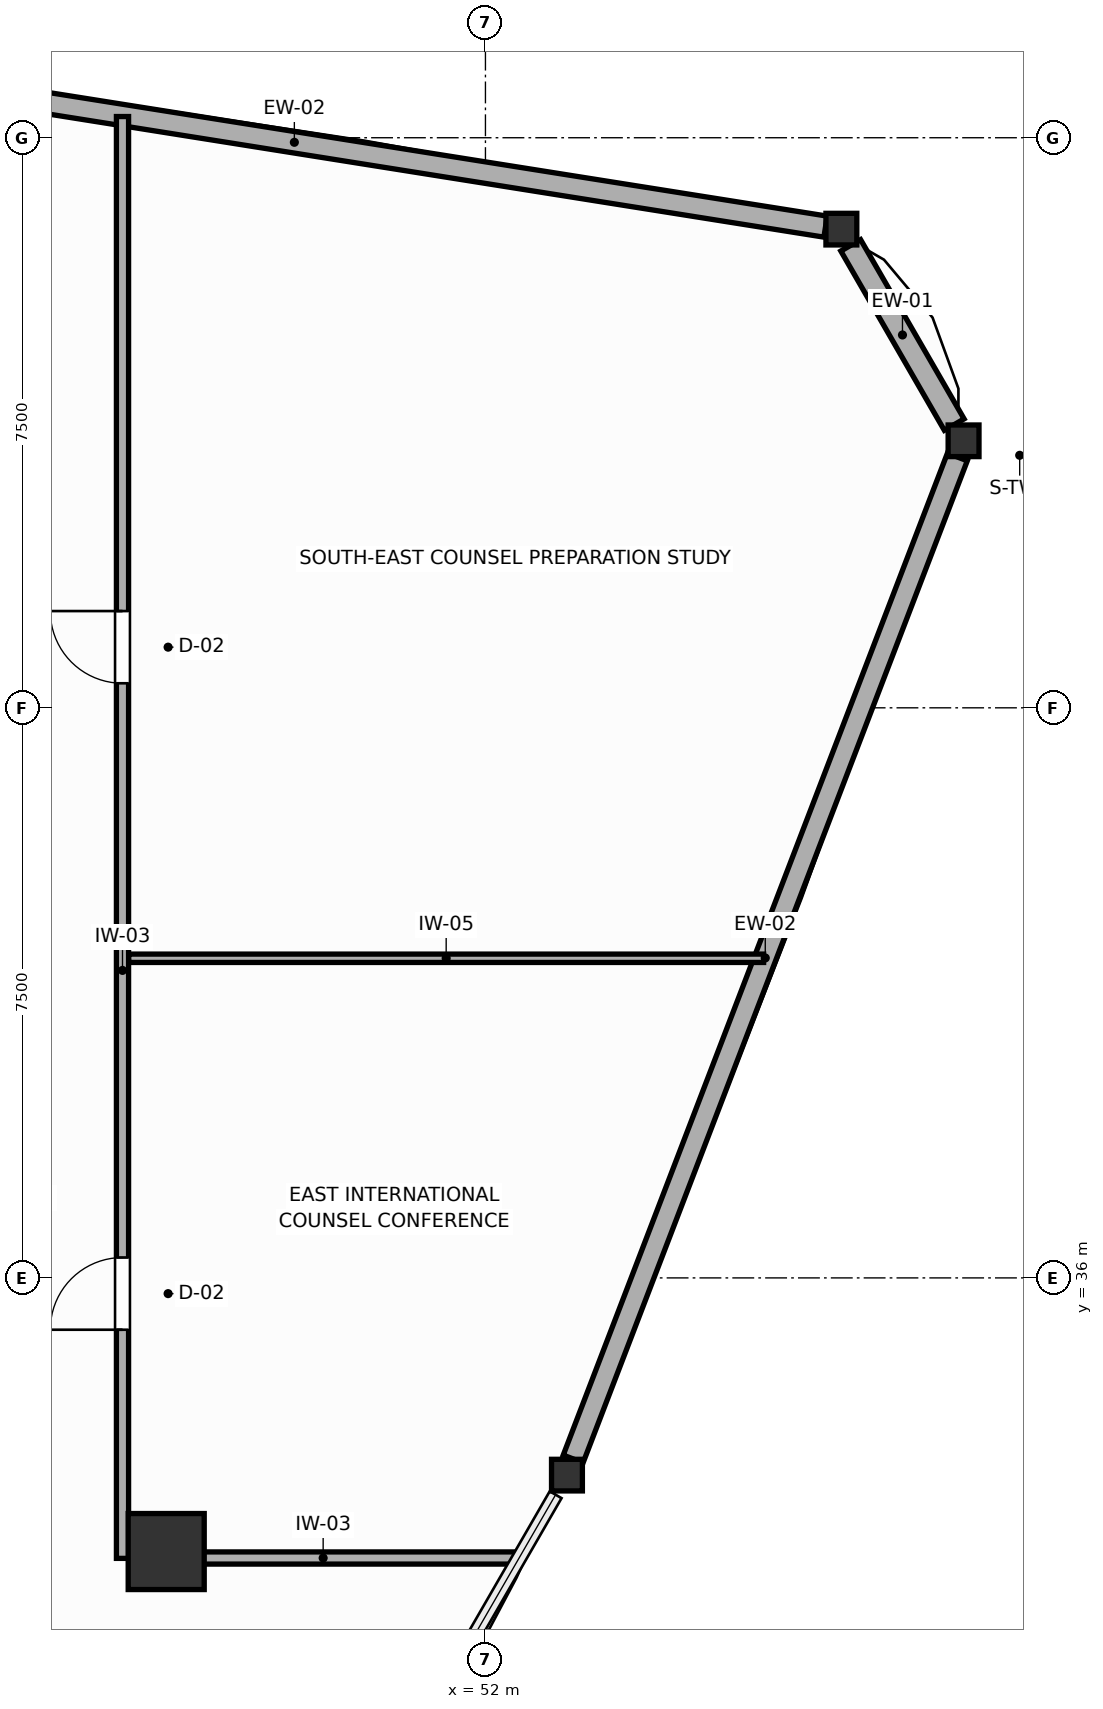
"""IFC4 building model, lengths in metres.
Left out: names, types, materials, properties, quantities, classifications, styles, units other than length and angle.
Written with IfcOpenShell. Run it as: python <this file> out.ifc"""

import sys

from ifc_helpers import new_model, si_unit, direction, frame, frame_2d, origin, origin_2d, place, context, subcontext, project, spatial, rectangle, i_section, extrude, source, transform, mapped, element, fill, save


model = new_model("IFC4")
c1 = context("Model", 3, precision=1e-05, world=origin(), true_north=direction((0.0, 1.0)))
c2 = subcontext(c1, "Body", "Model", "MODEL_VIEW")
j1 = project(units=[si_unit("LENGTHUNIT", "METRE"), si_unit("PLANEANGLEUNIT", "RADIAN")], contexts=[c1])
p1 = place(None, origin())
s1 = spatial("IfcSite", under=j1, at=p1, CompositionType="ELEMENT")
p2 = place(p1, origin())
s2 = spatial("IfcBuilding", under=s1, at=p2, CompositionType="ELEMENT")
p3 = place(p2, frame((0.0, 0.0, 183.0)))
s3 = spatial("IfcBuildingStorey", under=s2, at=p3, CompositionType="ELEMENT", Elevation=183.0)
m1 = source(origin(), c2, "Body", "SweptSolid", [
    extrude(rectangle(XDim=1.0, YDim=1.0, at=origin_2d()), origin(), (0.0, 0.0, 1.0), 3.6),
])
p4 = place(p3, frame((47.8, 32.4, 0.0), z_axis=(0.0, 0.0, 1.0), x_axis=(1.0, 0.0, 0.0)))
e1 = element("IfcColumn", 1, at=p4, inside=s3, PredefinedType="COLUMN", context=c2, shape_type="MappedRepresentation", body=[
    mapped(m1, transform((0.0, 0.0, 0.0), scale=1.0)),
])
m2 = source(origin(), c2, "Body", "SweptSolid", [
    extrude(i_section(OverallWidth=0.406, OverallDepth=0.416, WebThickness=0.027, FlangeThickness=0.044, FilletRadius=0.015, at=origin_2d()), origin(), (0.0, 0.0, 1.0), 3.6),
])
for number, where, z_axis, x_axis in (
    (2, (58.29, 47.013, 0.0), (0.0, 0.0, 1.0), (1.0, 0.0, 0.0)),
    (3, (56.683, 49.798, 0.0), (0.0, 0.0, 1.0), (1.0, 0.0, 0.0)),
    (4, (53.073, 33.406, 0.0), (0.0, 0.0, 1.0), (1.0, 0.0, 0.0)),
):
    element("IfcColumn", number, at=place(p3, frame(where, z_axis=z_axis, x_axis=x_axis)), inside=s3, PredefinedType="COLUMN", context=c2, shape_type="MappedRepresentation", body=[
        mapped(m2, transform((0.0, 0.0, 0.0), scale=1.0)),
    ])
p5 = place(p3, frame((58.167, 47.226, 0.0), z_axis=(0.0, 0.0, 1.0), x_axis=(-0.499947493121, 0.866055716523, 0.0)))
e5 = element("IfcWall", 5, at=p5, inside=s3, PredefinedType="SOLIDWALL", context=c2, shape_type="SweptSolid", body=[
    extrude(rectangle(XDim=2.723, YDim=0.3, at=frame_2d((1.362, 0.0))), origin(), (0.0, 0.0, 1.0), 1.87),
])
p6 = place(p3, frame((56.475, 49.831, 0.0), z_axis=(0.0, 0.0, 1.0), x_axis=(-0.987634086957, 0.156776625426, 0.0)))
e6 = element("IfcWall", 6, at=p6, inside=s3, PredefinedType="SOLIDWALL", context=c2, shape_type="SweptSolid", body=[
    extrude(rectangle(XDim=14.152, YDim=0.28, at=frame_2d((7.076, 0.0))), origin(), (0.0, 0.0, 1.0), 1.87),
])
p7 = place(p3, frame((53.154, 33.618, 0.0), z_axis=(0.0, 0.0, 1.0), x_axis=(0.358033263681, 0.933708831541, 0.0)))
e7 = element("IfcWall", 7, at=p7, inside=s3, PredefinedType="SOLIDWALL", context=c2, shape_type="SweptSolid", body=[
    extrude(rectangle(XDim=14.117, YDim=0.28, at=frame_2d((7.059, 0.0))), origin(), (0.0, 0.0, 1.0), 1.87),
])
p8 = place(p3, frame((47.225, 32.31, 0.0), z_axis=(0.0, 0.0, 1.0), x_axis=(0.0, 1.0, 0.0)))
e8 = element("IfcWall", 8, at=p8, inside=s3, PredefinedType="PARTITIONING", context=c2, shape_type="SweptSolid", body=[
    extrude(rectangle(XDim=18.969, YDim=0.16, at=frame_2d((9.484, 0.0))), origin(), (0.0, 0.0, 1.0), 3.4),
])
p9 = place(p8, frame((3.008, 0.0, 0.0)))
e9 = element("IfcOpeningElement", 9, at=p9, cuts=e8, PredefinedType="OPENING", context=c2, shape_type="SweptSolid", body=[
    extrude(rectangle(XDim=0.95, YDim=2.05, at=frame_2d((0.475, 1.025))), frame((0.0, 0.09, 0.0), z_axis=(0.0, -1.0, 0.0), x_axis=(1.0, 0.0, 0.0)), (0.0, 0.0, 1.0), 0.18),
])
p10 = place(p8, frame((11.513, 0.0, 0.0)))
e10 = element("IfcOpeningElement", 10, at=p10, cuts=e8, PredefinedType="OPENING", context=c2, shape_type="SweptSolid", body=[
    extrude(rectangle(XDim=0.95, YDim=2.05, at=frame_2d((0.475, 1.025))), frame((0.0, 0.09, 0.0), z_axis=(0.0, -1.0, 0.0), x_axis=(1.0, 0.0, 0.0)), (0.0, 0.0, 1.0), 0.18),
])
p11 = place(p3, frame((47.307, 32.315, 0.0), z_axis=(0.0, 0.0, 1.0), x_axis=(1.0, 0.0, 0.0)))
e11 = element("IfcWall", 11, at=p11, inside=s3, PredefinedType="PARTITIONING", context=c2, shape_type="SweptSolid", body=[
    extrude(rectangle(XDim=5.116, YDim=0.16, at=frame_2d((2.558, 0.0))), origin(), (0.0, 0.0, 1.0), 2.16),
])
p12 = place(p3, frame((47.307, 40.205, 0.0), z_axis=(0.0, 0.0, 1.0), x_axis=(1.0, 0.0, 0.0)))
e12 = element("IfcWall", 12, at=p12, inside=s3, PredefinedType="MOVABLE", context=c2, shape_type="SweptSolid", body=[
    extrude(rectangle(XDim=8.353, YDim=0.11, at=frame_2d((4.176, 0.0))), origin(), (0.0, 0.0, 1.0), 3.4),
])
p13 = place(p9, origin())
e13 = element("IfcDoor", 13, at=p13, inside=s3, OperationType="SINGLE_SWING_LEFT", PredefinedType="DOOR", context=c2, shape_type="SweptSolid", body=[
    extrude(rectangle(XDim=0.95, YDim=2.05, at=frame_2d((0.475, 1.025))), frame((0.0, 0.025, 0.0), z_axis=(0.0, -1.0, 0.0), x_axis=(1.0, 0.0, 0.0)), (0.0, 0.0, 1.0), 0.05),
])
fill(e9, e13)
p14 = place(p10, origin())
e14 = element("IfcDoor", 14, at=p14, inside=s3, OperationType="SINGLE_SWING_RIGHT", PredefinedType="DOOR", context=c2, shape_type="SweptSolid", body=[
    extrude(rectangle(XDim=0.95, YDim=2.05, at=frame_2d((0.475, 1.025))), frame((0.0, 0.025, 0.0), z_axis=(0.0, -1.0, 0.0), x_axis=(1.0, 0.0, 0.0)), (0.0, 0.0, 1.0), 0.05),
])
fill(e10, e14)
save(model, sys.argv[1])
